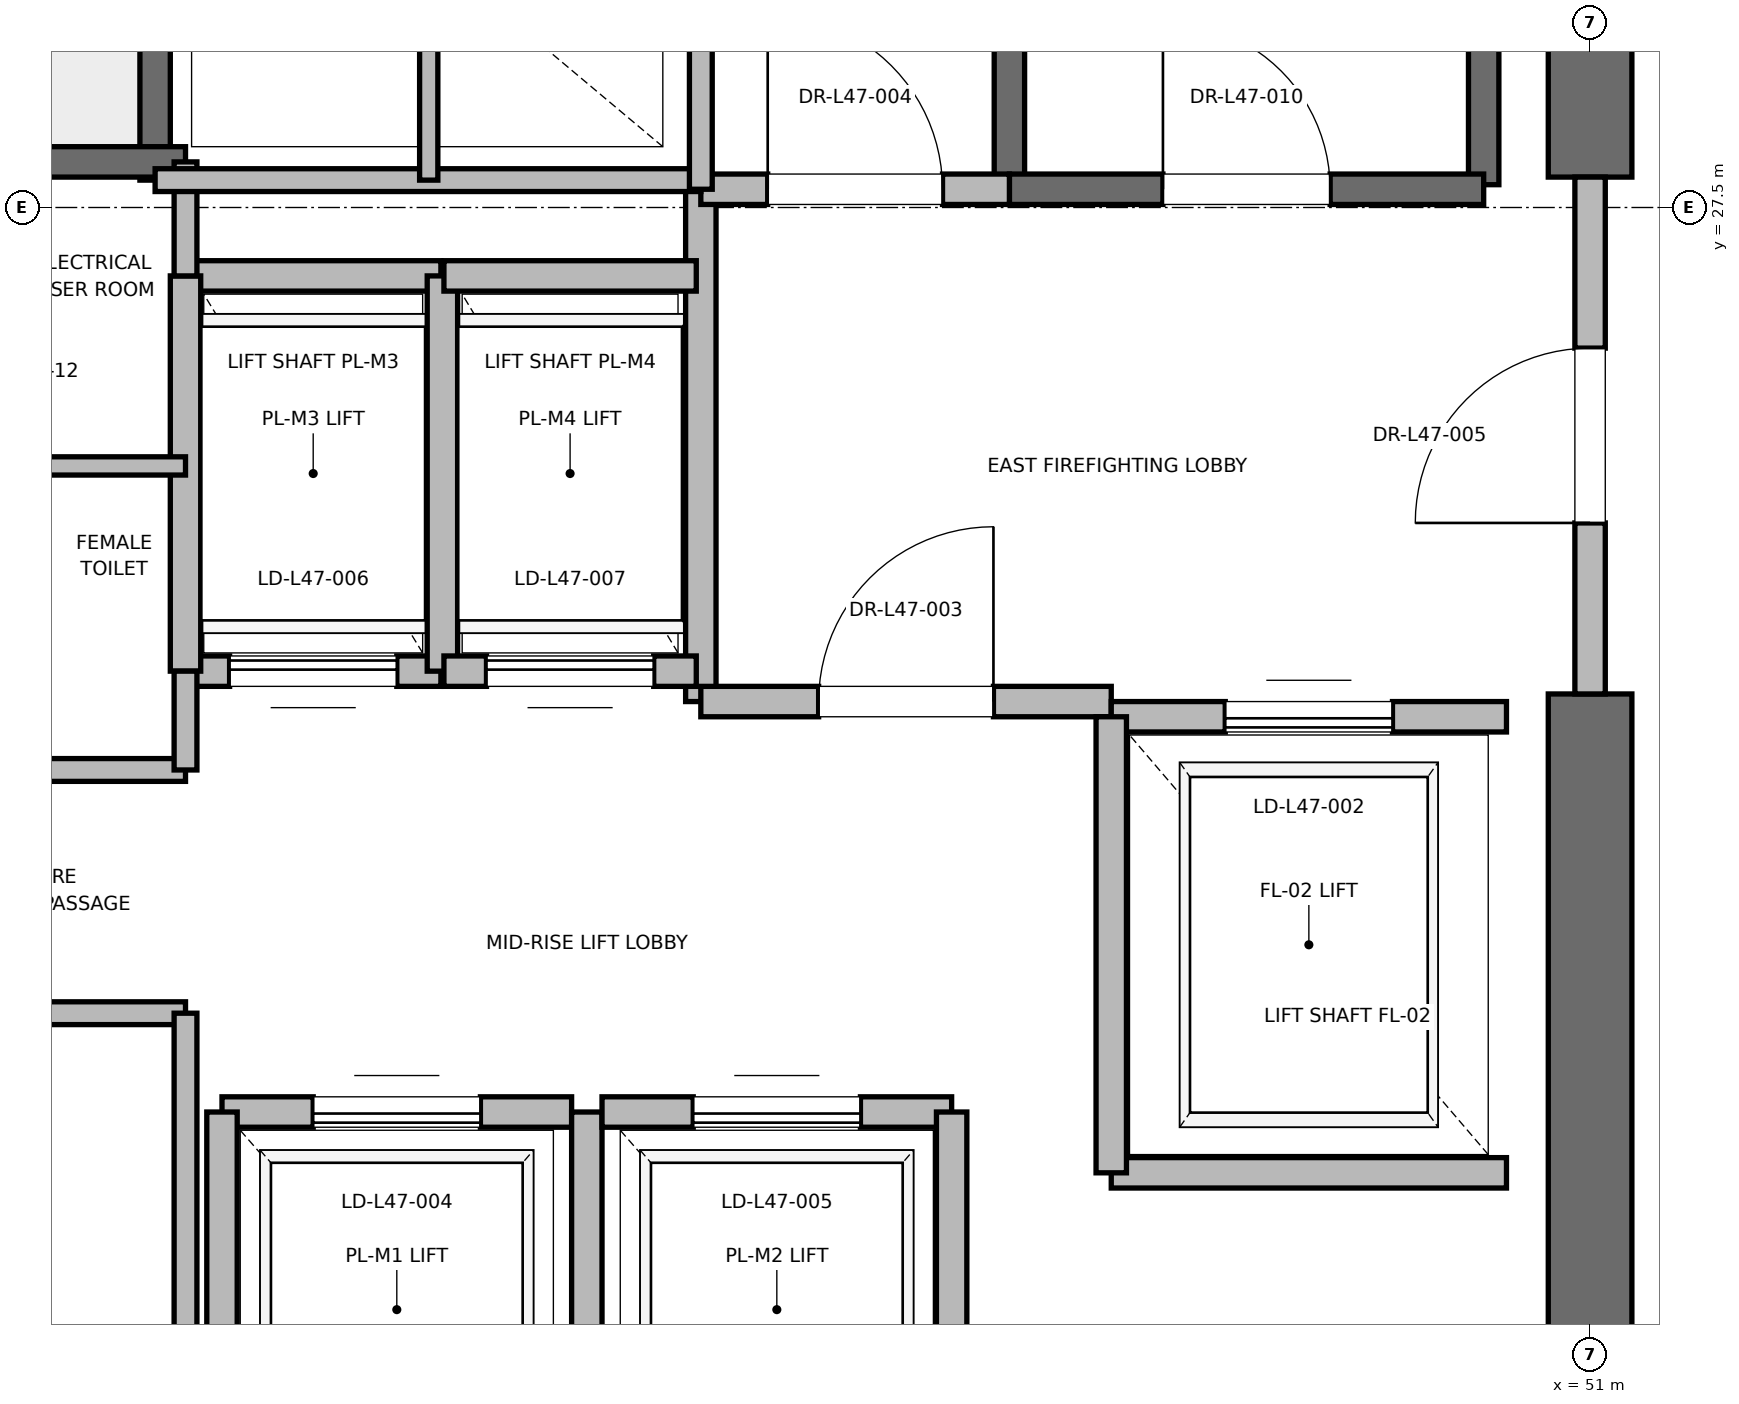
"""IFC4 building model, lengths in metres.
Left out: names, types, materials, properties, quantities, classifications, styles, units other than length and angle.
Written with IfcOpenShell. Run it as: python <this file> out.ifc"""

import sys

from ifc_helpers import new_model, si_unit, direction, frame, frame_2d, origin, place, context, subcontext, project, spatial, rectangle, extrude, element, fill, save


model = new_model("IFC4")
c1 = context("Model", 3, precision=1e-05, world=origin(), true_north=direction((0.0, 1.0)))
c2 = subcontext(c1, "Body", "Model", "MODEL_VIEW")
j1 = project(units=[si_unit("LENGTHUNIT", "METRE"), si_unit("PLANEANGLEUNIT", "RADIAN")], contexts=[c1])
p1 = place(None, origin())
s1 = spatial("IfcSite", under=j1, at=p1, CompositionType="ELEMENT")
p2 = place(p1, origin())
s2 = spatial("IfcBuilding", under=s1, at=p2, CompositionType="ELEMENT")
p3 = place(p2, frame((0.0, 0.0, 205.2)))
s3 = spatial("IfcBuildingStorey", under=s2, at=p3, CompositionType="ELEMENT", Elevation=205.2)
p4 = place(p3, frame((51.0, 18.5, 0.0), z_axis=(0.0, 0.0, 1.0), x_axis=(0.0, 1.0, 0.0)))
e1 = element("IfcWall", 1, at=p4, inside=s3, PredefinedType="SHEAR", context=c2, shape_type="SweptSolid", body=[
    extrude(rectangle(XDim=5.8, YDim=0.55, at=frame_2d((2.9, 0.0))), origin(), (0.0, 0.0, 1.0), 3.775),
])
p5 = place(p3, frame((51.0, 27.7, 0.0), z_axis=(0.0, 0.0, 1.0), x_axis=(0.0, 1.0, 0.0)))
e2 = element("IfcWall", 2, at=p5, inside=s3, PredefinedType="SHEAR", context=c2, shape_type="SweptSolid", body=[
    extrude(rectangle(XDim=8.8, YDim=0.55, at=frame_2d((4.4, 0.0))), origin(), (0.0, 0.0, 1.0), 3.775),
])
p6 = place(p3, frame((50.3, 27.65, 0.0), z_axis=(0.0, 0.0, 1.0), x_axis=(0.0, 1.0, 0.0)))
e3 = element("IfcWall", 3, at=p6, inside=s3, PredefinedType="SOLIDWALL", context=c2, shape_type="SweptSolid", body=[
    extrude(rectangle(XDim=8.15, YDim=0.2, at=frame_2d((4.075, 0.0))), origin(), (0.0, 0.0, 1.0), 3.775),
])
p7 = place(p3, frame((47.18, 27.62, 0.0), z_axis=(0.0, 0.0, 1.0), x_axis=(0.0, 1.0, 0.0)))
e4 = element("IfcWall", 4, at=p7, inside=s3, PredefinedType="SOLIDWALL", context=c2, shape_type="SweptSolid", body=[
    extrude(rectangle(XDim=8.18, YDim=0.2, at=frame_2d((4.09, 0.0))), origin(), (0.0, 0.0, 1.0), 3.775),
])
p8 = place(p3, frame((47.18, 27.62, 0.0), z_axis=(0.0, 0.0, 1.0), x_axis=(1.0, 0.0, 0.0)))
e5 = element("IfcWall", 5, at=p8, inside=s3, PredefinedType="SOLIDWALL", context=c2, shape_type="SweptSolid", body=[
    extrude(rectangle(XDim=3.12, YDim=0.2, at=frame_2d((1.56, 0.0))), origin(), (0.0, 0.0, 1.0), 3.775),
])
p9 = place(p8, frame((1.01, 0.0, 0.0)))
e6 = element("IfcOpeningElement", 6, at=p9, cuts=e5, PredefinedType="OPENING", context=c2, shape_type="SweptSolid", body=[
    extrude(rectangle(XDim=1.1, YDim=2.15, at=frame_2d((0.55, 1.075))), frame((0.0, 0.1, 0.0), z_axis=(0.0, -1.0, 0.0), x_axis=(1.0, 0.0, 0.0)), (0.0, 0.0, 1.0), 0.2),
])
p10 = place(p3, frame((41.56, 27.68, 0.0), z_axis=(0.0, 0.0, 1.0), x_axis=(0.0, 1.0, 0.0)))
e7 = element("IfcWall", 7, at=p10, inside=s3, PredefinedType="SOLIDWALL", context=c2, shape_type="SweptSolid", body=[
    extrude(rectangle(XDim=8.57, YDim=0.2, at=frame_2d((4.285, 0.0))), origin(), (0.0, 0.0, 1.0), 3.775),
])
p11 = place(p3, frame((38.44, 27.8, 0.0), z_axis=(0.0, 0.0, 1.0), x_axis=(1.0, 0.0, 0.0)))
e8 = element("IfcWall", 8, at=p11, inside=s3, PredefinedType="SOLIDWALL", context=c2, shape_type="SweptSolid", body=[
    extrude(rectangle(XDim=3.32, YDim=0.2, at=frame_2d((1.66, 0.0))), origin(), (0.0, 0.0, 1.0), 3.775),
])
p12 = place(p3, frame((45.15, 24.25, 0.0), z_axis=(0.0, 0.0, 1.0), x_axis=(0.0, 1.0, 0.0)))
e9 = element("IfcWall", 9, at=p12, inside=s3, PredefinedType="PARTITIONING", context=c2, shape_type="SweptSolid", body=[
    extrude(rectangle(XDim=3.37, YDim=0.2, at=frame_2d((1.685, 0.0))), origin(), (0.0, 0.0, 1.0), 3.775),
])
p13 = place(p3, frame((45.15, 24.25, 0.0), z_axis=(0.0, 0.0, 1.0), x_axis=(1.0, 0.0, 0.0)))
e10 = element("IfcWall", 10, at=p13, inside=s3, PredefinedType="PARTITIONING", context=c2, shape_type="SweptSolid", body=[
    extrude(rectangle(XDim=2.7, YDim=0.2, at=frame_2d((1.35, 0.0))), origin(), (0.0, 0.0, 1.0), 3.775),
])
p14 = place(p13, frame((0.775, 0.0, 0.0)))
e11 = element("IfcOpeningElement", 11, at=p14, cuts=e10, PredefinedType="OPENING", context=c2, shape_type="SweptSolid", body=[
    extrude(rectangle(XDim=1.15, YDim=2.2, at=frame_2d((0.575, 1.1))), frame((0.0, 0.1, 0.0), z_axis=(0.0, -1.0, 0.0), x_axis=(1.0, 0.0, 0.0)), (0.0, 0.0, 1.0), 0.2),
])
p15 = place(p3, frame((45.15, 27.62, 0.0), z_axis=(0.0, 0.0, 1.0), x_axis=(1.0, 0.0, 0.0)))
e12 = element("IfcWall", 12, at=p15, inside=s3, PredefinedType="PARTITIONING", context=c2, shape_type="SweptSolid", body=[
    extrude(rectangle(XDim=2.03, YDim=0.2, at=frame_2d((1.015, 0.0))), origin(), (0.0, 0.0, 1.0), 3.775),
])
p16 = place(p15, frame((0.44, 0.0, 0.0)))
e13 = element("IfcOpeningElement", 13, at=p16, cuts=e12, PredefinedType="OPENING", context=c2, shape_type="SweptSolid", body=[
    extrude(rectangle(XDim=1.15, YDim=2.2, at=frame_2d((0.575, 1.1))), frame((0.0, 0.1, 0.0), z_axis=(0.0, -1.0, 0.0), x_axis=(1.0, 0.0, 0.0)), (0.0, 0.0, 1.0), 0.2),
])
p17 = place(p3, frame((51.0, 24.3, 0.0), z_axis=(0.0, 0.0, 1.0), x_axis=(0.0, 1.0, 0.0)))
e14 = element("IfcWall", 14, at=p17, inside=s3, PredefinedType="PARTITIONING", context=c2, shape_type="SweptSolid", body=[
    extrude(rectangle(XDim=3.4, YDim=0.2, at=frame_2d((1.7, 0.0))), origin(), (0.0, 0.0, 1.0), 2.755),
])
p18 = place(p17, frame((1.125, 0.0, 0.0)))
e15 = element("IfcOpeningElement", 15, at=p18, cuts=e14, PredefinedType="OPENING", context=c2, shape_type="SweptSolid", body=[
    extrude(rectangle(XDim=1.15, YDim=2.2, at=frame_2d((0.575, 1.1))), frame((0.0, 0.1, 0.0), z_axis=(0.0, -1.0, 0.0), x_axis=(1.0, 0.0, 0.0)), (0.0, 0.0, 1.0), 0.2),
])
p19 = place(p3, frame((47.85, 21.15, 0.0), z_axis=(0.0, 0.0, 1.0), x_axis=(1.0, 0.0, 0.0)))
e16 = element("IfcWall", 16, at=p19, inside=s3, PredefinedType="SOLIDWALL", context=c2, shape_type="SweptSolid", body=[
    extrude(rectangle(XDim=2.6, YDim=0.2, at=frame_2d((1.3, 0.0))), origin(), (0.0, 0.0, 1.0), 3.775),
])
p20 = place(p3, frame((50.45, 24.15, 0.0), z_axis=(0.0, 0.0, 1.0), x_axis=(-1.0, 0.0, 0.0)))
e17 = element("IfcWall", 17, at=p20, inside=s3, PredefinedType="SOLIDWALL", context=c2, shape_type="SweptSolid", body=[
    extrude(rectangle(XDim=2.6, YDim=0.2, at=frame_2d((1.3, 0.0))), origin(), (0.0, 0.0, 1.0), 2.755),
])
p21 = place(p20, frame((0.75, 0.0, 0.0)))
e18 = element("IfcOpeningElement", 18, at=p21, cuts=e17, PredefinedType="OPENING", context=c2, shape_type="SweptSolid", body=[
    extrude(rectangle(XDim=1.1, YDim=2.2, at=frame_2d((0.55, 1.1))), frame((0.0, 0.1, 0.0), z_axis=(0.0, -1.0, 0.0), x_axis=(1.0, 0.0, 0.0)), (0.0, 0.0, 1.0), 0.2),
])
p22 = place(p3, frame((47.85, 24.15, 0.0), z_axis=(0.0, 0.0, 1.0), x_axis=(0.0, -1.0, 0.0)))
e19 = element("IfcWall", 19, at=p22, inside=s3, PredefinedType="SOLIDWALL", context=c2, shape_type="SweptSolid", body=[
    extrude(rectangle(XDim=3.0, YDim=0.2, at=frame_2d((1.5, 0.0))), origin(), (0.0, 0.0, 1.0), 3.775),
])
p23 = place(p3, frame((44.3, 21.55, 0.0), z_axis=(0.0, 0.0, 1.0), x_axis=(-1.0, 0.0, 0.0)))
e20 = element("IfcWall", 20, at=p23, inside=s3, PredefinedType="SOLIDWALL", context=c2, shape_type="SweptSolid", body=[
    extrude(rectangle(XDim=2.3, YDim=0.2, at=frame_2d((1.15, 0.0))), origin(), (0.0, 0.0, 1.0), 3.775),
])
p24 = place(p23, frame((0.6, 0.0, 0.0)))
e21 = element("IfcOpeningElement", 21, at=p24, cuts=e20, PredefinedType="OPENING", context=c2, shape_type="SweptSolid", body=[
    extrude(rectangle(XDim=1.1, YDim=2.2, at=frame_2d((0.55, 1.1))), frame((0.0, 0.1, 0.0), z_axis=(0.0, -1.0, 0.0), x_axis=(1.0, 0.0, 0.0)), (0.0, 0.0, 1.0), 0.2),
])
p25 = place(p3, frame((42.0, 21.55, 0.0), z_axis=(0.0, 0.0, 1.0), x_axis=(0.0, -1.0, 0.0)))
e22 = element("IfcWall", 22, at=p25, inside=s3, PredefinedType="SOLIDWALL", context=c2, shape_type="SweptSolid", body=[
    extrude(rectangle(XDim=2.6, YDim=0.2, at=frame_2d((1.3, 0.0))), origin(), (0.0, 0.0, 1.0), 2.755),
])
p26 = place(p3, frame((44.4, 18.95, 0.0), z_axis=(0.0, 0.0, 1.0), x_axis=(0.0, 1.0, 0.0)))
e23 = element("IfcWall", 23, at=p26, inside=s3, PredefinedType="SOLIDWALL", context=c2, shape_type="SweptSolid", body=[
    extrude(rectangle(XDim=2.6, YDim=0.2, at=frame_2d((1.3, 0.0))), origin(), (0.0, 0.0, 1.0), 3.775),
])
p27 = place(p3, frame((46.8, 21.55, 0.0), z_axis=(0.0, 0.0, 1.0), x_axis=(-1.0, 0.0, 0.0)))
e24 = element("IfcWall", 24, at=p27, inside=s3, PredefinedType="SOLIDWALL", context=c2, shape_type="SweptSolid", body=[
    extrude(rectangle(XDim=2.3, YDim=0.2, at=frame_2d((1.15, 0.0))), origin(), (0.0, 0.0, 1.0), 3.775),
])
p28 = place(p27, frame((0.6, 0.0, 0.0)))
e25 = element("IfcOpeningElement", 25, at=p28, cuts=e24, PredefinedType="OPENING", context=c2, shape_type="SweptSolid", body=[
    extrude(rectangle(XDim=1.1, YDim=2.2, at=frame_2d((0.55, 1.1))), frame((0.0, 0.1, 0.0), z_axis=(0.0, -1.0, 0.0), x_axis=(1.0, 0.0, 0.0)), (0.0, 0.0, 1.0), 0.2),
])
p29 = place(p3, frame((46.8, 18.95, 0.0), z_axis=(0.0, 0.0, 1.0), x_axis=(0.0, 1.0, 0.0)))
e26 = element("IfcWall", 26, at=p29, inside=s3, PredefinedType="SOLIDWALL", context=c2, shape_type="SweptSolid", body=[
    extrude(rectangle(XDim=2.6, YDim=0.2, at=frame_2d((1.3, 0.0))), origin(), (0.0, 0.0, 1.0), 3.775),
])
p30 = place(p3, frame((41.76, 24.45, 0.0), z_axis=(0.0, 0.0, 1.0), x_axis=(1.0, 0.0, 0.0)))
e27 = element("IfcWall", 27, at=p30, inside=s3, PredefinedType="SOLIDWALL", context=c2, shape_type="SweptSolid", body=[
    extrude(rectangle(XDim=1.68, YDim=0.2, at=frame_2d((0.84, 0.0))), origin(), (0.0, 0.0, 1.0), 3.775),
])
p31 = place(p30, frame((0.29, 0.0, 0.0)))
e28 = element("IfcOpeningElement", 28, at=p31, cuts=e27, PredefinedType="OPENING", context=c2, shape_type="SweptSolid", body=[
    extrude(rectangle(XDim=1.1, YDim=2.2, at=frame_2d((0.55, 1.1))), frame((0.0, 0.1, 0.0), z_axis=(0.0, -1.0, 0.0), x_axis=(1.0, 0.0, 0.0)), (0.0, 0.0, 1.0), 0.2),
])
p32 = place(p3, frame((43.44, 27.05, 0.0), z_axis=(0.0, 0.0, 1.0), x_axis=(-1.0, 0.0, 0.0)))
e29 = element("IfcWall", 29, at=p32, inside=s3, PredefinedType="SOLIDWALL", context=c2, shape_type="SweptSolid", body=[
    extrude(rectangle(XDim=1.68, YDim=0.2, at=frame_2d((0.84, 0.0))), origin(), (0.0, 0.0, 1.0), 3.775),
])
for number, where, z_axis, x_axis in (
    (30, (41.76, 27.05, 0.0), (0.0, 0.0, 1.0), (0.0, -1.0, 0.0)),
    (31, (43.45, 24.45, 0.0), (0.0, 0.0, 1.0), (0.0, 1.0, 0.0)),
):
    element("IfcWall", number, at=place(p3, frame(where, z_axis=z_axis, x_axis=x_axis)), inside=s3, PredefinedType="SOLIDWALL", context=c2, shape_type="SweptSolid", body=[
        extrude(rectangle(XDim=2.6, YDim=0.2, at=frame_2d((1.3, 0.0))), origin(), (0.0, 0.0, 1.0), 3.775),
    ])
p33 = place(p3, frame((43.46, 24.45, 0.0), z_axis=(0.0, 0.0, 1.0), x_axis=(1.0, 0.0, 0.0)))
e32 = element("IfcWall", 32, at=p33, inside=s3, PredefinedType="SOLIDWALL", context=c2, shape_type="SweptSolid", body=[
    extrude(rectangle(XDim=1.66, YDim=0.2, at=frame_2d((0.83, 0.0))), origin(), (0.0, 0.0, 1.0), 3.775),
])
p34 = place(p33, frame((0.28, 0.0, 0.0)))
e33 = element("IfcOpeningElement", 33, at=p34, cuts=e32, PredefinedType="OPENING", context=c2, shape_type="SweptSolid", body=[
    extrude(rectangle(XDim=1.1, YDim=2.2, at=frame_2d((0.55, 1.1))), frame((0.0, 0.1, 0.0), z_axis=(0.0, -1.0, 0.0), x_axis=(1.0, 0.0, 0.0)), (0.0, 0.0, 1.0), 0.2),
])
p35 = place(p3, frame((45.12, 27.05, 0.0), z_axis=(0.0, 0.0, 1.0), x_axis=(-1.0, 0.0, 0.0)))
e34 = element("IfcWall", 34, at=p35, inside=s3, PredefinedType="SOLIDWALL", context=c2, shape_type="SweptSolid", body=[
    extrude(rectangle(XDim=1.66, YDim=0.2, at=frame_2d((0.83, 0.0))), origin(), (0.0, 0.0, 1.0), 3.775),
])
for number, where, z_axis, x_axis in (
    (35, (39.95, 22.2, 0.0), (0.0, 0.0, 1.0), (1.0, 0.0, 0.0)),
    (36, (39.95, 23.8, 0.0), (0.0, 0.0, 1.0), (1.0, 0.0, 0.0)),
):
    element("IfcWall", number, at=place(p3, frame(where, z_axis=z_axis, x_axis=x_axis)), inside=s3, PredefinedType="PARTITIONING", context=c2, shape_type="SweptSolid", body=[
        extrude(rectangle(XDim=1.81, YDim=0.15, at=frame_2d((0.905, 0.0))), origin(), (0.0, 0.0, 1.0), 2.85),
    ])
p36 = place(p3, frame((39.95, 25.8, 0.0), z_axis=(0.0, 0.0, 1.0), x_axis=(1.0, 0.0, 0.0)))
e37 = element("IfcWall", 37, at=p36, inside=s3, PredefinedType="PARTITIONING", context=c2, shape_type="SweptSolid", body=[
    extrude(rectangle(XDim=1.81, YDim=0.12, at=frame_2d((0.905, 0.0))), origin(), (0.0, 0.0, 1.0), 2.85),
])
p37 = place(p3, frame((41.76, 18.6, 0.0), z_axis=(0.0, 0.0, 1.0), x_axis=(0.0, 1.0, 0.0)))
e38 = element("IfcWall", 38, at=p37, inside=s3, PredefinedType="PARTITIONING", context=c2, shape_type="SweptSolid", body=[
    extrude(rectangle(XDim=3.6, YDim=0.15, at=frame_2d((1.8, 0.0))), origin(), (0.0, 0.0, 1.0), 2.755),
])
p38 = place(p3, frame((41.76, 23.8, 0.0), z_axis=(0.0, 0.0, 1.0), x_axis=(0.0, 1.0, 0.0)))
e39 = element("IfcWall", 39, at=p38, inside=s3, PredefinedType="PARTITIONING", context=c2, shape_type="SweptSolid", body=[
    extrude(rectangle(XDim=0.65, YDim=0.15, at=frame_2d((0.325, 0.0))), origin(), (0.0, 0.0, 1.0), 2.85),
])
p39 = place(p3, frame((41.76, 27.05, 0.0), z_axis=(0.0, 0.0, 1.0), x_axis=(0.0, 1.0, 0.0)))
e40 = element("IfcWall", 40, at=p39, inside=s3, PredefinedType="PARTITIONING", context=c2, shape_type="SweptSolid", body=[
    extrude(rectangle(XDim=0.75, YDim=0.15, at=frame_2d((0.375, 0.0))), origin(), (0.0, 0.0, 1.0), 2.85),
])
p40 = place(p3, frame((41.56, 27.68, 0.0), z_axis=(0.0, 0.0, 1.0), x_axis=(1.0, 0.0, 0.0)))
e41 = element("IfcWall", 41, at=p40, inside=s3, PredefinedType="PARTITIONING", context=c2, shape_type="SweptSolid", body=[
    extrude(rectangle(XDim=3.59, YDim=0.15, at=frame_2d((1.795, 0.0))), origin(), (0.0, 0.0, 1.0), 2.85),
])
p41 = place(p3, frame((45.15, 27.62, 0.0), z_axis=(0.0, 0.0, 1.0), x_axis=(0.0, 1.0, 0.0)))
e42 = element("IfcWall", 42, at=p41, inside=s3, PredefinedType="PARTITIONING", context=c2, shape_type="SweptSolid", body=[
    extrude(rectangle(XDim=3.1, YDim=0.15, at=frame_2d((1.55, 0.0))), origin(), (0.0, 0.0, 1.0), 2.85),
])
p42 = place(p3, frame((43.36, 27.68, 0.0), z_axis=(0.0, 0.0, 1.0), x_axis=(0.0, 1.0, 0.0)))
e43 = element("IfcWall", 43, at=p42, inside=s3, PredefinedType="PARTITIONING", context=c2, shape_type="SweptSolid", body=[
    extrude(rectangle(XDim=3.04, YDim=0.12, at=frame_2d((1.52, 0.0))), origin(), (0.0, 0.0, 1.0), 2.85),
])
p43 = place(p9, origin())
e44 = element("IfcDoor", 44, at=p43, inside=s3, OperationType="SINGLE_SWING_LEFT", PredefinedType="DOOR", context=c2, shape_type="SweptSolid", body=[
    extrude(rectangle(XDim=1.1, YDim=2.15, at=frame_2d((0.55, 1.075))), frame((0.0, 0.025, 0.0), z_axis=(0.0, -1.0, 0.0), x_axis=(1.0, 0.0, 0.0)), (0.0, 0.0, 1.0), 0.05),
])
fill(e6, e44)
p44 = place(p14, origin())
e45 = element("IfcDoor", 45, at=p44, inside=s3, OperationType="SINGLE_SWING_RIGHT", PredefinedType="DOOR", context=c2, shape_type="SweptSolid", body=[
    extrude(rectangle(XDim=1.15, YDim=2.2, at=frame_2d((0.575, 1.1))), frame((0.0, 0.025, 0.0), z_axis=(0.0, -1.0, 0.0), x_axis=(1.0, 0.0, 0.0)), (0.0, 0.0, 1.0), 0.05),
])
fill(e11, e45)
p45 = place(p16, origin())
e46 = element("IfcDoor", 46, at=p45, inside=s3, OperationType="SINGLE_SWING_LEFT", PredefinedType="DOOR", context=c2, shape_type="SweptSolid", body=[
    extrude(rectangle(XDim=1.15, YDim=2.2, at=frame_2d((0.575, 1.1))), frame((0.0, 0.025, 0.0), z_axis=(0.0, -1.0, 0.0), x_axis=(1.0, 0.0, 0.0)), (0.0, 0.0, 1.0), 0.05),
])
fill(e13, e46)
p46 = place(p18, origin())
e47 = element("IfcDoor", 47, at=p46, inside=s3, OperationType="SINGLE_SWING_LEFT", PredefinedType="DOOR", context=c2, shape_type="SweptSolid", body=[
    extrude(rectangle(XDim=1.15, YDim=2.2, at=frame_2d((0.575, 1.1))), frame((0.0, 0.025, 0.0), z_axis=(0.0, -1.0, 0.0), x_axis=(1.0, 0.0, 0.0)), (0.0, 0.0, 1.0), 0.05),
])
fill(e15, e47)
p47 = place(p21, origin())
e48 = element("IfcDoor", 48, at=p47, inside=s3, OperationType="SLIDING_TO_RIGHT", PredefinedType="DOOR", context=c2, shape_type="SweptSolid", body=[
    extrude(rectangle(XDim=1.1, YDim=2.2, at=frame_2d((0.55, 1.1))), frame((0.0, 0.025, 0.0), z_axis=(0.0, -1.0, 0.0), x_axis=(1.0, 0.0, 0.0)), (0.0, 0.0, 1.0), 0.05),
])
fill(e18, e48)
p48 = place(p24, origin())
e49 = element("IfcDoor", 49, at=p48, inside=s3, OperationType="SLIDING_TO_RIGHT", PredefinedType="DOOR", context=c2, shape_type="SweptSolid", body=[
    extrude(rectangle(XDim=1.1, YDim=2.2, at=frame_2d((0.55, 1.1))), frame((0.0, 0.025, 0.0), z_axis=(0.0, -1.0, 0.0), x_axis=(1.0, 0.0, 0.0)), (0.0, 0.0, 1.0), 0.05),
])
fill(e21, e49)
p49 = place(p28, origin())
e50 = element("IfcDoor", 50, at=p49, inside=s3, OperationType="SLIDING_TO_RIGHT", PredefinedType="DOOR", context=c2, shape_type="SweptSolid", body=[
    extrude(rectangle(XDim=1.1, YDim=2.2, at=frame_2d((0.55, 1.1))), frame((0.0, 0.025, 0.0), z_axis=(0.0, -1.0, 0.0), x_axis=(1.0, 0.0, 0.0)), (0.0, 0.0, 1.0), 0.05),
])
fill(e25, e50)
p50 = place(p31, origin())
e51 = element("IfcDoor", 51, at=p50, inside=s3, OperationType="SLIDING_TO_RIGHT", PredefinedType="DOOR", context=c2, shape_type="SweptSolid", body=[
    extrude(rectangle(XDim=1.1, YDim=2.2, at=frame_2d((0.55, 1.1))), frame((0.0, 0.025, 0.0), z_axis=(0.0, -1.0, 0.0), x_axis=(1.0, 0.0, 0.0)), (0.0, 0.0, 1.0), 0.05),
])
fill(e28, e51)
p51 = place(p34, origin())
e52 = element("IfcDoor", 52, at=p51, inside=s3, OperationType="SLIDING_TO_RIGHT", PredefinedType="DOOR", context=c2, shape_type="SweptSolid", body=[
    extrude(rectangle(XDim=1.1, YDim=2.2, at=frame_2d((0.55, 1.1))), frame((0.0, 0.025, 0.0), z_axis=(0.0, -1.0, 0.0), x_axis=(1.0, 0.0, 0.0)), (0.0, 0.0, 1.0), 0.05),
])
fill(e33, e52)
save(model, sys.argv[1])
